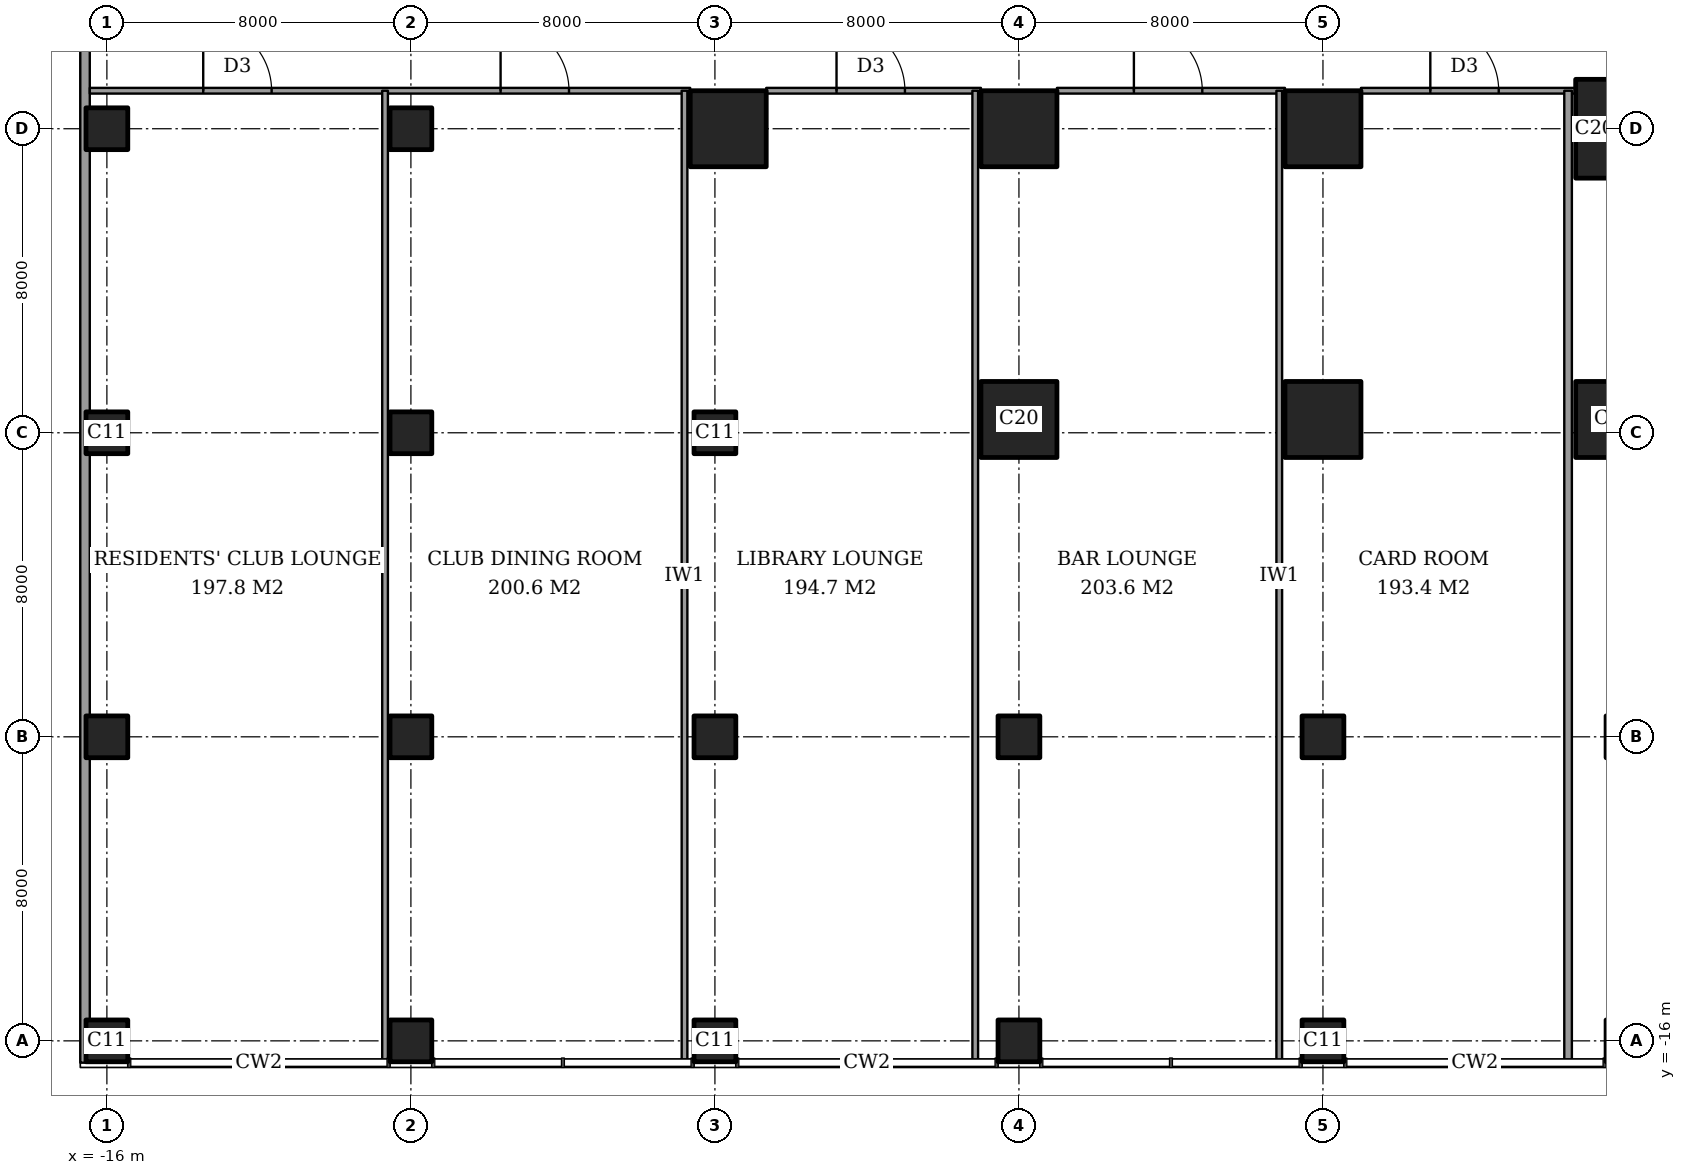
"""IFC4 building model, lengths in metres.
Left out: names, types, materials, properties, quantities, classifications, styles, units other than length and angle.
Written with IfcOpenShell. Run it as: python <this file> out.ifc"""

import sys

from ifc_helpers import new_model, si_unit, direction, frame, frame_2d, origin, origin_2d, place, context, subcontext, project, spatial, rectangle, extrude, element, fill, save


model = new_model("IFC4")
c1 = context("Model", 3, precision=1e-05, world=origin(), true_north=direction((0.0, 1.0)))
c2 = subcontext(c1, "Body", "Model", "MODEL_VIEW")
j1 = project(units=[si_unit("LENGTHUNIT", "METRE"), si_unit("PLANEANGLEUNIT", "RADIAN")], contexts=[c1])
p1 = place(None, origin())
s1 = spatial("IfcSite", under=j1, at=p1, CompositionType="ELEMENT")
p2 = place(p1, origin())
s2 = spatial("IfcBuilding", under=s1, at=p2, CompositionType="ELEMENT")
p3 = place(p2, frame((0.0, 0.0, 6.0)))
s3 = spatial("IfcBuildingStorey", under=s2, at=p3, CompositionType="ELEMENT", Elevation=6.0)
for number, where, z_axis, x_axis in (
    (1, (-16.0, -16.0, 0.0), (0.0, 0.0, 1.0), (1.0, 0.0, 0.0)),
    (2, (-16.0, -8.0, 0.0), (0.0, 0.0, 1.0), (1.0, 0.0, 0.0)),
    (3, (-16.0, 0.0, 0.0), (0.0, 0.0, 1.0), (1.0, 0.0, 0.0)),
    (4, (-16.0, 8.0, 0.0), (0.0, 0.0, 1.0), (1.0, 0.0, 0.0)),
    (5, (-8.0, -16.0, 0.0), (0.0, 0.0, 1.0), (1.0, 0.0, 0.0)),
    (6, (-8.0, -8.0, 0.0), (0.0, 0.0, 1.0), (1.0, 0.0, 0.0)),
    (7, (-8.0, 0.0, 0.0), (0.0, 0.0, 1.0), (1.0, 0.0, 0.0)),
    (8, (-8.0, 8.0, 0.0), (0.0, 0.0, 1.0), (1.0, 0.0, 0.0)),
    (9, (0.0, -16.0, 0.0), (0.0, 0.0, 1.0), (1.0, 0.0, 0.0)),
    (10, (0.0, -8.0, 0.0), (0.0, 0.0, 1.0), (1.0, 0.0, 0.0)),
    (11, (0.0, 0.0, 0.0), (0.0, 0.0, 1.0), (1.0, 0.0, 0.0)),
):
    element("IfcColumn", number, at=place(p3, frame(where, z_axis=z_axis, x_axis=x_axis)), inside=s3, PredefinedType="COLUMN", context=c2, shape_type="SweptSolid", body=[
        extrude(rectangle(XDim=1.1, YDim=1.1, at=origin_2d()), origin(), (0.0, 0.0, 1.0), 5.0),
    ])
p4 = place(p3, frame((0.35, 8.0, 0.0), z_axis=(0.0, 0.0, 1.0), x_axis=(1.0, 0.0, 0.0)))
e12 = element("IfcColumn", 12, at=p4, inside=s3, PredefinedType="COLUMN", context=c2, shape_type="SweptSolid", body=[
    extrude(rectangle(XDim=2.0, YDim=2.0, at=origin_2d()), origin(), (0.0, 0.0, 1.0), 5.0),
])
for number, where, z_axis, x_axis in (
    (13, (8.0, -16.0, 0.0), (0.0, 0.0, 1.0), (1.0, 0.0, 0.0)),
    (14, (8.0, -8.0, 0.0), (0.0, 0.0, 1.0), (1.0, 0.0, 0.0)),
):
    element("IfcColumn", number, at=place(p3, frame(where, z_axis=z_axis, x_axis=x_axis)), inside=s3, PredefinedType="COLUMN", context=c2, shape_type="SweptSolid", body=[
        extrude(rectangle(XDim=1.1, YDim=1.1, at=origin_2d()), origin(), (0.0, 0.0, 1.0), 5.0),
    ])
for number, where, z_axis, x_axis in (
    (15, (8.0, 0.35, 0.0), (0.0, 0.0, 1.0), (1.0, 0.0, 0.0)),
    (16, (8.0, 8.0, 0.0), (0.0, 0.0, 1.0), (1.0, 0.0, 0.0)),
):
    element("IfcColumn", number, at=place(p3, frame(where, z_axis=z_axis, x_axis=x_axis)), inside=s3, PredefinedType="COLUMN", context=c2, shape_type="SweptSolid", body=[
        extrude(rectangle(XDim=2.0, YDim=2.0, at=origin_2d()), origin(), (0.0, 0.0, 1.0), 5.0),
    ])
for number, where, z_axis, x_axis in (
    (17, (16.0, -16.0, 0.0), (0.0, 0.0, 1.0), (1.0, 0.0, 0.0)),
    (18, (16.0, -8.0, 0.0), (0.0, 0.0, 1.0), (1.0, 0.0, 0.0)),
):
    element("IfcColumn", number, at=place(p3, frame(where, z_axis=z_axis, x_axis=x_axis)), inside=s3, PredefinedType="COLUMN", context=c2, shape_type="SweptSolid", body=[
        extrude(rectangle(XDim=1.1, YDim=1.1, at=origin_2d()), origin(), (0.0, 0.0, 1.0), 5.0),
    ])
for number, where, z_axis, x_axis in (
    (19, (16.0, 0.35, 0.0), (0.0, 0.0, 1.0), (1.0, 0.0, 0.0)),
    (20, (16.0, 8.0, 0.0), (0.0, 0.0, 1.0), (1.0, 0.0, 0.0)),
    (21, (23.65, 0.35, 0.0), (0.0, 0.0, 1.0), (1.0, 0.0, 0.0)),
):
    element("IfcColumn", number, at=place(p3, frame(where, z_axis=z_axis, x_axis=x_axis)), inside=s3, PredefinedType="COLUMN", context=c2, shape_type="SweptSolid", body=[
        extrude(rectangle(XDim=2.0, YDim=2.0, at=origin_2d()), origin(), (0.0, 0.0, 1.0), 5.0),
    ])
p5 = place(p3, frame((23.65, 8.0, 0.0), z_axis=(0.0, 0.0, 1.0), x_axis=(1.0, 0.0, 0.0)))
e22 = element("IfcColumn", 22, at=p5, inside=s3, PredefinedType="COLUMN", context=c2, shape_type="SweptSolid", body=[
    extrude(rectangle(XDim=2.0, YDim=2.6, at=origin_2d()), origin(), (0.0, 0.0, 1.0), 5.0),
])
p6 = place(p3, frame((-16.575, 56.575, 0.0), z_axis=(0.0, 0.0, 1.0), x_axis=(0.0, -1.0, 0.0)))
e23 = element("IfcWall", 23, at=p6, inside=s3, PredefinedType="SOLIDWALL", context=c2, shape_type="SweptSolid", body=[
    extrude(rectangle(XDim=73.15, YDim=0.25, at=frame_2d((36.575, 0.0))), origin(), (0.0, 0.0, 1.0), 5.0),
])
p7 = place(p3, frame((-16.45, 9.0, 0.0), z_axis=(0.0, 0.0, 1.0), x_axis=(1.0, 0.0, 0.0)))
e24 = element("IfcWall", 24, at=p7, inside=s3, PredefinedType="PARTITIONING", context=c2, shape_type="SweptSolid", body=[
    extrude(rectangle(XDim=15.8, YDim=0.15, at=frame_2d((7.9, 0.0))), origin(), (0.0, 0.0, 1.0), 4.7),
])
p8 = place(p7, frame((2.985, 0.0, 0.0)))
e25 = element("IfcOpeningElement", 25, at=p8, cuts=e24, PredefinedType="OPENING", context=c2, shape_type="SweptSolid", body=[
    extrude(rectangle(XDim=1.8, YDim=2.1, at=frame_2d((0.9, 1.05))), frame((0.0, 0.085, 0.0), z_axis=(0.0, -1.0, 0.0), x_axis=(1.0, 0.0, 0.0)), (0.0, 0.0, 1.0), 0.17),
])
p9 = place(p7, frame((10.81, 0.0, 0.0)))
e26 = element("IfcOpeningElement", 26, at=p9, cuts=e24, PredefinedType="OPENING", context=c2, shape_type="SweptSolid", body=[
    extrude(rectangle(XDim=1.8, YDim=2.1, at=frame_2d((0.9, 1.05))), frame((0.0, 0.085, 0.0), z_axis=(0.0, -1.0, 0.0), x_axis=(1.0, 0.0, 0.0)), (0.0, 0.0, 1.0), 0.17),
])
p10 = place(p3, frame((1.35, 9.0, 0.0), z_axis=(0.0, 0.0, 1.0), x_axis=(1.0, 0.0, 0.0)))
e27 = element("IfcWall", 27, at=p10, inside=s3, PredefinedType="PARTITIONING", context=c2, shape_type="SweptSolid", body=[
    extrude(rectangle(XDim=5.65, YDim=0.15, at=frame_2d((2.825, 0.0))), origin(), (0.0, 0.0, 1.0), 4.7),
])
p11 = place(p10, frame((1.85, 0.0, 0.0)))
e28 = element("IfcOpeningElement", 28, at=p11, cuts=e27, PredefinedType="OPENING", context=c2, shape_type="SweptSolid", body=[
    extrude(rectangle(XDim=1.8, YDim=2.1, at=frame_2d((0.9, 1.05))), frame((0.0, 0.085, 0.0), z_axis=(0.0, -1.0, 0.0), x_axis=(1.0, 0.0, 0.0)), (0.0, 0.0, 1.0), 0.17),
])
p12 = place(p3, frame((9.0, 9.0, 0.0), z_axis=(0.0, 0.0, 1.0), x_axis=(1.0, 0.0, 0.0)))
e29 = element("IfcWall", 29, at=p12, inside=s3, PredefinedType="PARTITIONING", context=c2, shape_type="SweptSolid", body=[
    extrude(rectangle(XDim=6.0, YDim=0.15, at=frame_2d((3.0, 0.0))), origin(), (0.0, 0.0, 1.0), 4.7),
])
p13 = place(p12, frame((2.025, 0.0, 0.0)))
e30 = element("IfcOpeningElement", 30, at=p13, cuts=e29, PredefinedType="OPENING", context=c2, shape_type="SweptSolid", body=[
    extrude(rectangle(XDim=1.8, YDim=2.1, at=frame_2d((0.9, 1.05))), frame((0.0, 0.085, 0.0), z_axis=(0.0, -1.0, 0.0), x_axis=(1.0, 0.0, 0.0)), (0.0, 0.0, 1.0), 0.17),
])
p14 = place(p3, frame((17.0, 9.0, 0.0), z_axis=(0.0, 0.0, 1.0), x_axis=(1.0, 0.0, 0.0)))
e31 = element("IfcWall", 31, at=p14, inside=s3, PredefinedType="PARTITIONING", context=c2, shape_type="SweptSolid", body=[
    extrude(rectangle(XDim=5.65, YDim=0.15, at=frame_2d((2.825, 0.0))), origin(), (0.0, 0.0, 1.0), 4.7),
])
p15 = place(p14, frame((1.825, 0.0, 0.0)))
e32 = element("IfcOpeningElement", 32, at=p15, cuts=e31, PredefinedType="OPENING", context=c2, shape_type="SweptSolid", body=[
    extrude(rectangle(XDim=1.8, YDim=2.1, at=frame_2d((0.9, 1.05))), frame((0.0, 0.085, 0.0), z_axis=(0.0, -1.0, 0.0), x_axis=(1.0, 0.0, 0.0)), (0.0, 0.0, 1.0), 0.17),
])
for number, where, z_axis, x_axis in (
    (33, (-8.68, -16.561, 0.0), (0.0, 0.0, 1.0), (0.0, 1.0, 0.0)),
    (34, (-0.8, -16.561, 0.0), (0.0, 0.0, 1.0), (0.0, 1.0, 0.0)),
    (35, (6.85, -16.561, 0.0), (0.0, 0.0, 1.0), (0.0, 1.0, 0.0)),
    (36, (14.85, -16.561, 0.0), (0.0, 0.0, 1.0), (0.0, 1.0, 0.0)),
):
    element("IfcWall", number, at=place(p3, frame(where, z_axis=z_axis, x_axis=x_axis)), inside=s3, PredefinedType="PARTITIONING", context=c2, shape_type="SweptSolid", body=[
        extrude(rectangle(XDim=25.561, YDim=0.15, at=frame_2d((12.781, 0.0))), origin(), (0.0, 0.0, 1.0), 4.7),
    ])
p16 = place(p3, frame((22.45, -16.561, 0.0), z_axis=(0.0, 0.0, 1.0), x_axis=(0.0, 1.0, 0.0)))
e37 = element("IfcWall", 37, at=p16, inside=s3, PredefinedType="PARTITIONING", context=c2, shape_type="SweptSolid", body=[
    extrude(rectangle(XDim=25.561, YDim=0.2, at=frame_2d((12.781, 0.0))), origin(), (0.0, 0.0, 1.0), 4.7),
])
p17 = place(p8, origin())
e38 = element("IfcDoor", 38, at=p17, inside=s3, OperationType="DOUBLE_DOOR_DOUBLE_SWING", PredefinedType="DOOR", context=c2, shape_type="SweptSolid", body=[
    extrude(rectangle(XDim=1.8, YDim=2.1, at=frame_2d((0.9, 1.05))), frame((0.0, 0.025, 0.0), z_axis=(0.0, -1.0, 0.0), x_axis=(1.0, 0.0, 0.0)), (0.0, 0.0, 1.0), 0.05),
])
fill(e25, e38)
p18 = place(p9, origin())
e39 = element("IfcDoor", 39, at=p18, inside=s3, OperationType="DOUBLE_DOOR_DOUBLE_SWING", PredefinedType="DOOR", context=c2, shape_type="SweptSolid", body=[
    extrude(rectangle(XDim=1.8, YDim=2.1, at=frame_2d((0.9, 1.05))), frame((0.0, 0.025, 0.0), z_axis=(0.0, -1.0, 0.0), x_axis=(1.0, 0.0, 0.0)), (0.0, 0.0, 1.0), 0.05),
])
fill(e26, e39)
p19 = place(p11, origin())
e40 = element("IfcDoor", 40, at=p19, inside=s3, OperationType="DOUBLE_DOOR_DOUBLE_SWING", PredefinedType="DOOR", context=c2, shape_type="SweptSolid", body=[
    extrude(rectangle(XDim=1.8, YDim=2.1, at=frame_2d((0.9, 1.05))), frame((0.0, 0.025, 0.0), z_axis=(0.0, -1.0, 0.0), x_axis=(1.0, 0.0, 0.0)), (0.0, 0.0, 1.0), 0.05),
])
fill(e28, e40)
p20 = place(p13, origin())
e41 = element("IfcDoor", 41, at=p20, inside=s3, OperationType="DOUBLE_DOOR_DOUBLE_SWING", PredefinedType="DOOR", context=c2, shape_type="SweptSolid", body=[
    extrude(rectangle(XDim=1.8, YDim=2.1, at=frame_2d((0.9, 1.05))), frame((0.0, 0.025, 0.0), z_axis=(0.0, -1.0, 0.0), x_axis=(1.0, 0.0, 0.0)), (0.0, 0.0, 1.0), 0.05),
])
fill(e30, e41)
p21 = place(p15, origin())
e42 = element("IfcDoor", 42, at=p21, inside=s3, OperationType="DOUBLE_DOOR_DOUBLE_SWING", PredefinedType="DOOR", context=c2, shape_type="SweptSolid", body=[
    extrude(rectangle(XDim=1.8, YDim=2.1, at=frame_2d((0.9, 1.05))), frame((0.0, 0.025, 0.0), z_axis=(0.0, -1.0, 0.0), x_axis=(1.0, 0.0, 0.0)), (0.0, 0.0, 1.0), 0.05),
])
fill(e32, e42)
save(model, sys.argv[1])
